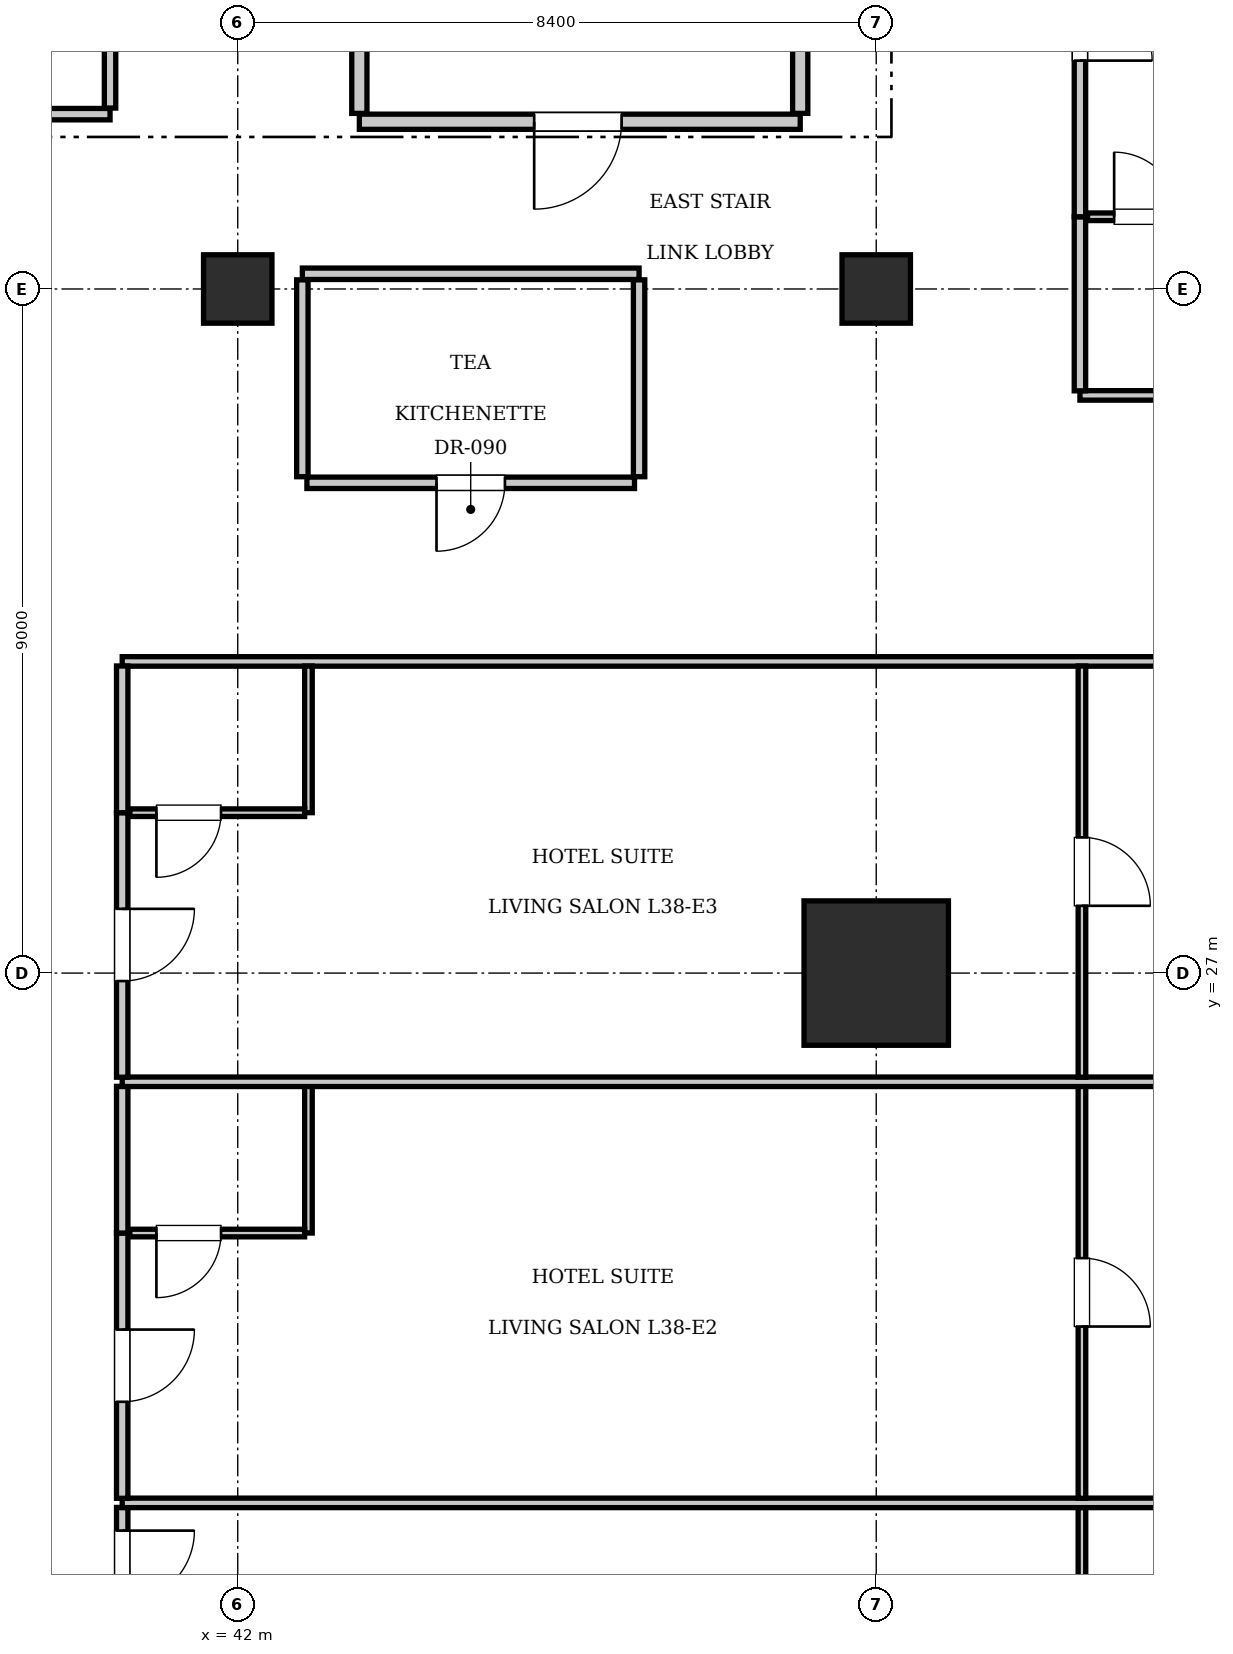
"""IFC4 building model, lengths in metres.
Left out: names, types, materials, properties, quantities, classifications, styles, units other than length and angle.
Written with IfcOpenShell. Run it as: python <this file> out.ifc"""

import sys

from ifc_helpers import new_model, si_unit, direction, frame, frame_2d, origin, origin_2d, place, context, subcontext, project, spatial, rectangle, extrude, element, fill, save


model = new_model("IFC4")
c1 = context("Model", 3, precision=1e-05, world=origin(), true_north=direction((0.0, 1.0)))
c2 = subcontext(c1, "Body", "Model", "MODEL_VIEW")
j1 = project(units=[si_unit("LENGTHUNIT", "METRE"), si_unit("PLANEANGLEUNIT", "RADIAN")], contexts=[c1])
p1 = place(None, origin())
s1 = spatial("IfcSite", under=j1, at=p1, CompositionType="ELEMENT")
p2 = place(p1, origin())
s2 = spatial("IfcBuilding", under=s1, at=p2, CompositionType="ELEMENT")
p3 = place(p2, frame((0.0, 0.0, 158.2)))
s3 = spatial("IfcBuildingStorey", under=s2, at=p3, CompositionType="ELEMENT", Elevation=158.2)
p4 = place(p3, frame((50.4, 27.0, 0.0), z_axis=(0.0, 0.0, 1.0), x_axis=(1.0, 0.0, 0.0)))
e1 = element("IfcColumn", 1, at=p4, inside=s3, PredefinedType="COLUMN", context=c2, shape_type="SweptSolid", body=[
    extrude(rectangle(XDim=1.9, YDim=1.9, at=origin_2d()), origin(), (0.0, 0.0, 1.0), 3.85),
])
for number, where, z_axis, x_axis in (
    (2, (42.0, 36.0, 0.0), (0.0, 0.0, 1.0), (1.0, 0.0, 0.0)),
    (3, (50.4, 36.0, 0.0), (0.0, 0.0, 1.0), (1.0, 0.0, 0.0)),
):
    element("IfcColumn", number, at=place(p3, frame(where, z_axis=z_axis, x_axis=x_axis)), inside=s3, PredefinedType="COLUMN", context=c2, shape_type="SweptSolid", body=[
        extrude(rectangle(XDim=0.9, YDim=0.9, at=origin_2d()), origin(), (0.0, 0.0, 1.0), 3.85),
    ])
p5 = place(p3, frame((43.6, 38.2, 0.0), z_axis=(0.0, 0.0, 1.0), x_axis=(1.0, 0.0, 0.0)))
e4 = element("IfcWall", 4, at=p5, inside=s3, PredefinedType="PARTITIONING", context=c2, shape_type="SweptSolid", body=[
    extrude(rectangle(XDim=5.8, YDim=0.2, at=frame_2d((2.9, 0.0))), origin(), (0.0, 0.0, 1.0), 3.61),
])
p6 = place(p5, frame((2.3, 0.0, 0.0)))
e5 = element("IfcOpeningElement", 5, at=p6, cuts=e4, PredefinedType="OPENING", context=c2, shape_type="SweptSolid", body=[
    extrude(rectangle(XDim=1.15, YDim=2.15, at=frame_2d((0.575, 1.075))), frame((0.0, 0.11, 0.0), z_axis=(0.0, -1.0, 0.0), x_axis=(1.0, 0.0, 0.0)), (0.0, 0.0, 1.0), 0.22),
])
for number, where, z_axis, x_axis in (
    (6, (43.6, 38.31, 0.0), (0.0, 0.0, 1.0), (0.0, 1.0, 0.0)),
    (7, (49.4, 38.31, 0.0), (0.0, 0.0, 1.0), (0.0, 1.0, 0.0)),
):
    element("IfcWall", number, at=place(p3, frame(where, z_axis=z_axis, x_axis=x_axis)), inside=s3, PredefinedType="PARTITIONING", context=c2, shape_type="SweptSolid", body=[
        extrude(rectangle(XDim=3.07, YDim=0.2, at=frame_2d((1.535, 0.0))), origin(), (0.0, 0.0, 1.0), 3.61),
    ])
p7 = place(p3, frame((37.38, 38.3, 0.0), z_axis=(0.0, 0.0, 1.0), x_axis=(1.0, 0.0, 0.0)))
e8 = element("IfcWall", 8, at=p7, inside=s3, PredefinedType="PARTITIONING", context=c2, shape_type="SweptSolid", body=[
    extrude(rectangle(XDim=2.94, YDim=0.15, at=frame_2d((1.47, 0.0))), origin(), (0.0, 0.0, 1.0), 3.61),
])
p8 = place(p7, frame((1.0, 0.0, 0.0)))
e9 = element("IfcOpeningElement", 9, at=p8, cuts=e8, PredefinedType="OPENING", context=c2, shape_type="SweptSolid", body=[
    extrude(rectangle(XDim=0.8, YDim=2.05, at=frame_2d((0.4, 1.025))), frame((0.0, 0.085, 0.0), z_axis=(0.0, -1.0, 0.0), x_axis=(1.0, 0.0, 0.0)), (0.0, 0.0, 1.0), 0.17),
])
p9 = place(p3, frame((40.32, 38.38, 0.0), z_axis=(0.0, 0.0, 1.0), x_axis=(0.0, 1.0, 0.0)))
e10 = element("IfcWall", 10, at=p9, inside=s3, PredefinedType="PARTITIONING", context=c2, shape_type="SweptSolid", body=[
    extrude(rectangle(XDim=2.84, YDim=0.15, at=frame_2d((1.42, 0.0))), origin(), (0.0, 0.0, 1.0), 3.61),
])
p10 = place(p3, frame((42.85, 36.2, 0.0), z_axis=(0.0, 0.0, 1.0), x_axis=(1.0, 0.0, 0.0)))
e11 = element("IfcWall", 11, at=p10, inside=s3, PredefinedType="PARTITIONING", context=c2, shape_type="SweptSolid", body=[
    extrude(rectangle(XDim=4.43, YDim=0.15, at=frame_2d((2.215, 0.0))), origin(), (0.0, 0.0, 1.0), 3.61),
])
for number, where, z_axis, x_axis in (
    (12, (42.85, 33.53, 0.0), (0.0, 0.0, 1.0), (0.0, 1.0, 0.0)),
    (13, (47.28, 33.53, 0.0), (0.0, 0.0, 1.0), (0.0, 1.0, 0.0)),
):
    element("IfcWall", number, at=place(p3, frame(where, z_axis=z_axis, x_axis=x_axis)), inside=s3, PredefinedType="PARTITIONING", context=c2, shape_type="SweptSolid", body=[
        extrude(rectangle(XDim=2.59, YDim=0.15, at=frame_2d((1.295, 0.0))), origin(), (0.0, 0.0, 1.0), 3.61),
    ])
p11 = place(p3, frame((42.91, 33.45, 0.0), z_axis=(0.0, 0.0, 1.0), x_axis=(1.0, 0.0, 0.0)))
e14 = element("IfcWall", 14, at=p11, inside=s3, PredefinedType="PARTITIONING", context=c2, shape_type="SweptSolid", body=[
    extrude(rectangle(XDim=4.31, YDim=0.15, at=frame_2d((2.155, 0.0))), origin(), (0.0, 0.0, 1.0), 3.61),
])
p12 = place(p11, frame((1.705, 0.0, 0.0)))
e15 = element("IfcOpeningElement", 15, at=p12, cuts=e14, PredefinedType="OPENING", context=c2, shape_type="SweptSolid", body=[
    extrude(rectangle(XDim=0.9, YDim=2.1, at=frame_2d((0.45, 1.05))), frame((0.0, 0.085, 0.0), z_axis=(0.0, -1.0, 0.0), x_axis=(1.0, 0.0, 0.0)), (0.0, 0.0, 1.0), 0.17),
])
p13 = place(p3, frame((40.48, 31.1, 0.0), z_axis=(0.0, 0.0, 1.0), x_axis=(1.0, 0.0, 0.0)))
e16 = element("IfcWall", 16, at=p13, inside=s3, PredefinedType="PARTITIONING", context=c2, shape_type="SweptSolid", body=[
    extrude(rectangle(XDim=21.92, YDim=0.125, at=frame_2d((10.96, 0.0))), origin(), (0.0, 0.0, 1.0), 3.61),
])
p14 = place(p3, frame((40.48, 16.49, 0.0), z_axis=(0.0, 0.0, 1.0), x_axis=(0.0, 1.0, 0.0)))
e17 = element("IfcWall", 17, at=p14, inside=s3, PredefinedType="PARTITIONING", context=c2, shape_type="SweptSolid", body=[
    extrude(rectangle(XDim=3.48, YDim=0.15, at=frame_2d((1.74, 0.0))), origin(), (0.0, 0.0, 1.0), 3.61),
])
p15 = place(p14, frame((2.225, 0.0, 0.0)))
e18 = element("IfcOpeningElement", 18, at=p15, cuts=e17, PredefinedType="OPENING", context=c2, shape_type="SweptSolid", body=[
    extrude(rectangle(XDim=0.95, YDim=2.15, at=frame_2d((0.475, 1.075))), frame((0.0, 0.085, 0.0), z_axis=(0.0, -1.0, 0.0), x_axis=(1.0, 0.0, 0.0)), (0.0, 0.0, 1.0), 0.17),
])
p16 = place(p3, frame((53.106, 14.56, 0.0), z_axis=(0.0, 0.0, 1.0), x_axis=(0.0, 1.0, 0.0)))
e19 = element("IfcWall", 19, at=p16, inside=s3, PredefinedType="PARTITIONING", context=c2, shape_type="SweptSolid", body=[
    extrude(rectangle(XDim=5.41, YDim=0.1, at=frame_2d((2.705, 0.0))), origin(), (0.0, 0.0, 1.0), 3.61),
])
p17 = place(p16, frame((2.255, 0.0, 0.0)))
e20 = element("IfcOpeningElement", 20, at=p17, cuts=e19, PredefinedType="OPENING", context=c2, shape_type="SweptSolid", body=[
    extrude(rectangle(XDim=0.9, YDim=2.1, at=frame_2d((0.45, 1.05))), frame((0.0, 0.06, 0.0), z_axis=(0.0, -1.0, 0.0), x_axis=(1.0, 0.0, 0.0)), (0.0, 0.0, 1.0), 0.12),
])
p18 = place(p3, frame((40.48, 20.03, 0.0), z_axis=(0.0, 0.0, 1.0), x_axis=(1.0, 0.0, 0.0)))
e21 = element("IfcWall", 21, at=p18, inside=s3, PredefinedType="PARTITIONING", context=c2, shape_type="SweptSolid", body=[
    extrude(rectangle(XDim=21.92, YDim=0.125, at=frame_2d((10.96, 0.0))), origin(), (0.0, 0.0, 1.0), 3.61),
])
p19 = place(p3, frame((40.48, 20.09, 0.0), z_axis=(0.0, 0.0, 1.0), x_axis=(0.0, 1.0, 0.0)))
e22 = element("IfcWall", 22, at=p19, inside=s3, PredefinedType="PARTITIONING", context=c2, shape_type="SweptSolid", body=[
    extrude(rectangle(XDim=3.49, YDim=0.15, at=frame_2d((1.745, 0.0))), origin(), (0.0, 0.0, 1.0), 3.61),
])
p20 = place(p19, frame((1.27, 0.0, 0.0)))
e23 = element("IfcOpeningElement", 23, at=p20, cuts=e22, PredefinedType="OPENING", context=c2, shape_type="SweptSolid", body=[
    extrude(rectangle(XDim=0.95, YDim=2.15, at=frame_2d((0.475, 1.075))), frame((0.0, 0.085, 0.0), z_axis=(0.0, -1.0, 0.0), x_axis=(1.0, 0.0, 0.0)), (0.0, 0.0, 1.0), 0.17),
])
p21 = place(p3, frame((40.48, 23.58, 0.0), z_axis=(0.0, 0.0, 1.0), x_axis=(0.0, 1.0, 0.0)))
e24 = element("IfcWall", 24, at=p21, inside=s3, PredefinedType="PARTITIONING", context=c2, shape_type="SweptSolid", body=[
    extrude(rectangle(XDim=1.93, YDim=0.15, at=frame_2d((0.965, 0.0))), origin(), (0.0, 0.0, 1.0), 3.61),
])
p22 = place(p3, frame((42.93, 23.58, 0.0), z_axis=(0.0, 0.0, 1.0), x_axis=(0.0, 1.0, 0.0)))
e25 = element("IfcWall", 25, at=p22, inside=s3, PredefinedType="PARTITIONING", context=c2, shape_type="SweptSolid", body=[
    extrude(rectangle(XDim=1.93, YDim=0.1, at=frame_2d((0.965, 0.0))), origin(), (0.0, 0.0, 1.0), 3.61),
])
p23 = place(p3, frame((40.58, 23.58, 0.0), z_axis=(0.0, 0.0, 1.0), x_axis=(1.0, 0.0, 0.0)))
e26 = element("IfcWall", 26, at=p23, inside=s3, PredefinedType="PARTITIONING", context=c2, shape_type="SweptSolid", body=[
    extrude(rectangle(XDim=2.3, YDim=0.1, at=frame_2d((1.15, 0.0))), origin(), (0.0, 0.0, 1.0), 3.61),
])
p24 = place(p23, frame((0.35, 0.0, 0.0)))
e27 = element("IfcOpeningElement", 27, at=p24, cuts=e26, PredefinedType="OPENING", context=c2, shape_type="SweptSolid", body=[
    extrude(rectangle(XDim=0.85, YDim=2.1, at=frame_2d((0.425, 1.05))), frame((0.0, 0.06, 0.0), z_axis=(0.0, -1.0, 0.0), x_axis=(1.0, 0.0, 0.0)), (0.0, 0.0, 1.0), 0.12),
])
p25 = place(p3, frame((53.106, 20.09, 0.0), z_axis=(0.0, 0.0, 1.0), x_axis=(0.0, 1.0, 0.0)))
e28 = element("IfcWall", 28, at=p25, inside=s3, PredefinedType="PARTITIONING", context=c2, shape_type="SweptSolid", body=[
    extrude(rectangle(XDim=5.42, YDim=0.1, at=frame_2d((2.71, 0.0))), origin(), (0.0, 0.0, 1.0), 3.61),
])
p26 = place(p25, frame((2.26, 0.0, 0.0)))
e29 = element("IfcOpeningElement", 29, at=p26, cuts=e28, PredefinedType="OPENING", context=c2, shape_type="SweptSolid", body=[
    extrude(rectangle(XDim=0.9, YDim=2.1, at=frame_2d((0.45, 1.05))), frame((0.0, 0.06, 0.0), z_axis=(0.0, -1.0, 0.0), x_axis=(1.0, 0.0, 0.0)), (0.0, 0.0, 1.0), 0.12),
])
p27 = place(p3, frame((40.48, 25.57, 0.0), z_axis=(0.0, 0.0, 1.0), x_axis=(1.0, 0.0, 0.0)))
e30 = element("IfcWall", 30, at=p27, inside=s3, PredefinedType="PARTITIONING", context=c2, shape_type="SweptSolid", body=[
    extrude(rectangle(XDim=21.92, YDim=0.125, at=frame_2d((10.96, 0.0))), origin(), (0.0, 0.0, 1.0), 3.61),
])
p28 = place(p3, frame((40.48, 25.63, 0.0), z_axis=(0.0, 0.0, 1.0), x_axis=(0.0, 1.0, 0.0)))
e31 = element("IfcWall", 31, at=p28, inside=s3, PredefinedType="PARTITIONING", context=c2, shape_type="SweptSolid", body=[
    extrude(rectangle(XDim=3.48, YDim=0.15, at=frame_2d((1.74, 0.0))), origin(), (0.0, 0.0, 1.0), 3.61),
])
p29 = place(p28, frame((1.265, 0.0, 0.0)))
e32 = element("IfcOpeningElement", 32, at=p29, cuts=e31, PredefinedType="OPENING", context=c2, shape_type="SweptSolid", body=[
    extrude(rectangle(XDim=0.95, YDim=2.15, at=frame_2d((0.475, 1.075))), frame((0.0, 0.085, 0.0), z_axis=(0.0, -1.0, 0.0), x_axis=(1.0, 0.0, 0.0)), (0.0, 0.0, 1.0), 0.17),
])
p30 = place(p3, frame((40.48, 29.11, 0.0), z_axis=(0.0, 0.0, 1.0), x_axis=(0.0, 1.0, 0.0)))
e33 = element("IfcWall", 33, at=p30, inside=s3, PredefinedType="PARTITIONING", context=c2, shape_type="SweptSolid", body=[
    extrude(rectangle(XDim=1.93, YDim=0.15, at=frame_2d((0.965, 0.0))), origin(), (0.0, 0.0, 1.0), 3.61),
])
p31 = place(p3, frame((42.93, 29.11, 0.0), z_axis=(0.0, 0.0, 1.0), x_axis=(0.0, 1.0, 0.0)))
e34 = element("IfcWall", 34, at=p31, inside=s3, PredefinedType="PARTITIONING", context=c2, shape_type="SweptSolid", body=[
    extrude(rectangle(XDim=1.93, YDim=0.1, at=frame_2d((0.965, 0.0))), origin(), (0.0, 0.0, 1.0), 3.61),
])
p32 = place(p3, frame((40.58, 29.11, 0.0), z_axis=(0.0, 0.0, 1.0), x_axis=(1.0, 0.0, 0.0)))
e35 = element("IfcWall", 35, at=p32, inside=s3, PredefinedType="PARTITIONING", context=c2, shape_type="SweptSolid", body=[
    extrude(rectangle(XDim=2.3, YDim=0.1, at=frame_2d((1.15, 0.0))), origin(), (0.0, 0.0, 1.0), 3.61),
])
p33 = place(p32, frame((0.35, 0.0, 0.0)))
e36 = element("IfcOpeningElement", 36, at=p33, cuts=e35, PredefinedType="OPENING", context=c2, shape_type="SweptSolid", body=[
    extrude(rectangle(XDim=0.85, YDim=2.1, at=frame_2d((0.425, 1.05))), frame((0.0, 0.06, 0.0), z_axis=(0.0, -1.0, 0.0), x_axis=(1.0, 0.0, 0.0)), (0.0, 0.0, 1.0), 0.12),
])
p34 = place(p3, frame((53.106, 25.63, 0.0), z_axis=(0.0, 0.0, 1.0), x_axis=(0.0, 1.0, 0.0)))
e37 = element("IfcWall", 37, at=p34, inside=s3, PredefinedType="PARTITIONING", context=c2, shape_type="SweptSolid", body=[
    extrude(rectangle(XDim=5.41, YDim=0.1, at=frame_2d((2.705, 0.0))), origin(), (0.0, 0.0, 1.0), 3.61),
])
p35 = place(p34, frame((2.255, 0.0, 0.0)))
e38 = element("IfcOpeningElement", 38, at=p35, cuts=e37, PredefinedType="OPENING", context=c2, shape_type="SweptSolid", body=[
    extrude(rectangle(XDim=0.9, YDim=2.1, at=frame_2d((0.45, 1.05))), frame((0.0, 0.06, 0.0), z_axis=(0.0, -1.0, 0.0), x_axis=(1.0, 0.0, 0.0)), (0.0, 0.0, 1.0), 0.12),
])
p36 = place(p3, frame((53.08, 34.6, 0.0), z_axis=(0.0, 0.0, 1.0), x_axis=(1.0, 0.0, 0.0)))
e39 = element("IfcWall", 39, at=p36, inside=s3, PredefinedType="PARTITIONING", context=c2, shape_type="SweptSolid", body=[
    extrude(rectangle(XDim=9.32, YDim=0.125, at=frame_2d((4.66, 0.0))), origin(), (0.0, 0.0, 1.0), 3.61),
])
p37 = place(p3, frame((53.08, 34.66, 0.0), z_axis=(0.0, 0.0, 1.0), x_axis=(0.0, 1.0, 0.0)))
e40 = element("IfcWall", 40, at=p37, inside=s3, PredefinedType="PARTITIONING", context=c2, shape_type="SweptSolid", body=[
    extrude(rectangle(XDim=2.29, YDim=0.15, at=frame_2d((1.145, 0.0))), origin(), (0.0, 0.0, 1.0), 3.61),
])
p38 = place(p3, frame((53.08, 36.95, 0.0), z_axis=(0.0, 0.0, 1.0), x_axis=(0.0, 1.0, 0.0)))
e41 = element("IfcWall", 41, at=p38, inside=s3, PredefinedType="PARTITIONING", context=c2, shape_type="SweptSolid", body=[
    extrude(rectangle(XDim=5.059, YDim=0.15, at=frame_2d((2.529, 0.0))), origin(), (0.0, 0.0, 1.0), 3.61),
])
p39 = place(p38, frame((2.054, 0.0, 0.0)))
e42 = element("IfcOpeningElement", 42, at=p39, cuts=e41, PredefinedType="OPENING", context=c2, shape_type="SweptSolid", body=[
    extrude(rectangle(XDim=0.95, YDim=2.15, at=frame_2d((0.475, 1.075))), frame((0.0, 0.085, 0.0), z_axis=(0.0, -1.0, 0.0), x_axis=(1.0, 0.0, 0.0)), (0.0, 0.0, 1.0), 0.17),
])
p40 = place(p3, frame((53.18, 36.95, 0.0), z_axis=(0.0, 0.0, 1.0), x_axis=(1.0, 0.0, 0.0)))
e43 = element("IfcWall", 43, at=p40, inside=s3, PredefinedType="PARTITIONING", context=c2, shape_type="SweptSolid", body=[
    extrude(rectangle(XDim=2.3, YDim=0.1, at=frame_2d((1.15, 0.0))), origin(), (0.0, 0.0, 1.0), 3.61),
])
p41 = place(p40, frame((0.35, 0.0, 0.0)))
e44 = element("IfcOpeningElement", 44, at=p41, cuts=e43, PredefinedType="OPENING", context=c2, shape_type="SweptSolid", body=[
    extrude(rectangle(XDim=0.85, YDim=2.1, at=frame_2d((0.425, 1.05))), frame((0.0, 0.06, 0.0), z_axis=(0.0, -1.0, 0.0), x_axis=(1.0, 0.0, 0.0)), (0.0, 0.0, 1.0), 0.12),
])
p42 = place(p6, frame((1.15, 0.0, 0.0), z_axis=(0.0, 0.0, 1.0), x_axis=(-1.0, 0.0, 0.0)))
e45 = element("IfcDoor", 45, at=p42, inside=s3, OperationType="SINGLE_SWING_RIGHT", PredefinedType="DOOR", context=c2, shape_type="SweptSolid", body=[
    extrude(rectangle(XDim=1.15, YDim=2.15, at=frame_2d((0.575, 1.075))), frame((0.0, 0.025, 0.0), z_axis=(0.0, -1.0, 0.0), x_axis=(1.0, 0.0, 0.0)), (0.0, 0.0, 1.0), 0.05),
])
fill(e5, e45)
p43 = place(p12, frame((0.9, 0.0, 0.0), z_axis=(0.0, 0.0, 1.0), x_axis=(-1.0, 0.0, 0.0)))
e46 = element("IfcDoor", 46, at=p43, inside=s3, OperationType="SINGLE_SWING_RIGHT", PredefinedType="DOOR", context=c2, shape_type="SweptSolid", body=[
    extrude(rectangle(XDim=0.9, YDim=2.1, at=frame_2d((0.45, 1.05))), frame((0.0, 0.025, 0.0), z_axis=(0.0, -1.0, 0.0), x_axis=(1.0, 0.0, 0.0)), (0.0, 0.0, 1.0), 0.05),
])
fill(e15, e46)
p44 = place(p15, frame((0.95, 0.0, 0.0), z_axis=(0.0, 0.0, 1.0), x_axis=(-1.0, 0.0, 0.0)))
e47 = element("IfcDoor", 47, at=p44, inside=s3, OperationType="SINGLE_SWING_LEFT", PredefinedType="DOOR", context=c2, shape_type="SweptSolid", body=[
    extrude(rectangle(XDim=0.95, YDim=2.15, at=frame_2d((0.475, 1.075))), frame((0.0, 0.025, 0.0), z_axis=(0.0, -1.0, 0.0), x_axis=(1.0, 0.0, 0.0)), (0.0, 0.0, 1.0), 0.05),
])
fill(e18, e47)
p45 = place(p24, frame((0.85, 0.0, 0.0), z_axis=(0.0, 0.0, 1.0), x_axis=(-1.0, 0.0, 0.0)))
e48 = element("IfcDoor", 48, at=p45, inside=s3, OperationType="SINGLE_SWING_RIGHT", PredefinedType="DOOR", context=c2, shape_type="SweptSolid", body=[
    extrude(rectangle(XDim=0.85, YDim=2.1, at=frame_2d((0.425, 1.05))), frame((0.0, 0.025, 0.0), z_axis=(0.0, -1.0, 0.0), x_axis=(1.0, 0.0, 0.0)), (0.0, 0.0, 1.0), 0.05),
])
fill(e27, e48)
p46 = place(p20, frame((0.95, 0.0, 0.0), z_axis=(0.0, 0.0, 1.0), x_axis=(-1.0, 0.0, 0.0)))
e49 = element("IfcDoor", 49, at=p46, inside=s3, OperationType="SINGLE_SWING_LEFT", PredefinedType="DOOR", context=c2, shape_type="SweptSolid", body=[
    extrude(rectangle(XDim=0.95, YDim=2.15, at=frame_2d((0.475, 1.075))), frame((0.0, 0.025, 0.0), z_axis=(0.0, -1.0, 0.0), x_axis=(1.0, 0.0, 0.0)), (0.0, 0.0, 1.0), 0.05),
])
fill(e23, e49)
p47 = place(p26, frame((0.9, 0.0, 0.0), z_axis=(0.0, 0.0, 1.0), x_axis=(-1.0, 0.0, 0.0)))
e50 = element("IfcDoor", 50, at=p47, inside=s3, OperationType="SINGLE_SWING_RIGHT", PredefinedType="DOOR", context=c2, shape_type="SweptSolid", body=[
    extrude(rectangle(XDim=0.9, YDim=2.1, at=frame_2d((0.45, 1.05))), frame((0.0, 0.025, 0.0), z_axis=(0.0, -1.0, 0.0), x_axis=(1.0, 0.0, 0.0)), (0.0, 0.0, 1.0), 0.05),
])
fill(e29, e50)
p48 = place(p33, frame((0.85, 0.0, 0.0), z_axis=(0.0, 0.0, 1.0), x_axis=(-1.0, 0.0, 0.0)))
e51 = element("IfcDoor", 51, at=p48, inside=s3, OperationType="SINGLE_SWING_RIGHT", PredefinedType="DOOR", context=c2, shape_type="SweptSolid", body=[
    extrude(rectangle(XDim=0.85, YDim=2.1, at=frame_2d((0.425, 1.05))), frame((0.0, 0.025, 0.0), z_axis=(0.0, -1.0, 0.0), x_axis=(1.0, 0.0, 0.0)), (0.0, 0.0, 1.0), 0.05),
])
fill(e36, e51)
p49 = place(p29, frame((0.95, 0.0, 0.0), z_axis=(0.0, 0.0, 1.0), x_axis=(-1.0, 0.0, 0.0)))
e52 = element("IfcDoor", 52, at=p49, inside=s3, OperationType="SINGLE_SWING_LEFT", PredefinedType="DOOR", context=c2, shape_type="SweptSolid", body=[
    extrude(rectangle(XDim=0.95, YDim=2.15, at=frame_2d((0.475, 1.075))), frame((0.0, 0.025, 0.0), z_axis=(0.0, -1.0, 0.0), x_axis=(1.0, 0.0, 0.0)), (0.0, 0.0, 1.0), 0.05),
])
fill(e32, e52)
p50 = place(p35, frame((0.9, 0.0, 0.0), z_axis=(0.0, 0.0, 1.0), x_axis=(-1.0, 0.0, 0.0)))
e53 = element("IfcDoor", 53, at=p50, inside=s3, OperationType="SINGLE_SWING_RIGHT", PredefinedType="DOOR", context=c2, shape_type="SweptSolid", body=[
    extrude(rectangle(XDim=0.9, YDim=2.1, at=frame_2d((0.45, 1.05))), frame((0.0, 0.025, 0.0), z_axis=(0.0, -1.0, 0.0), x_axis=(1.0, 0.0, 0.0)), (0.0, 0.0, 1.0), 0.05),
])
fill(e38, e53)
p51 = place(p41, origin())
e54 = element("IfcDoor", 54, at=p51, inside=s3, OperationType="SINGLE_SWING_LEFT", PredefinedType="DOOR", context=c2, shape_type="SweptSolid", body=[
    extrude(rectangle(XDim=0.85, YDim=2.1, at=frame_2d((0.425, 1.05))), frame((0.0, 0.025, 0.0), z_axis=(0.0, -1.0, 0.0), x_axis=(1.0, 0.0, 0.0)), (0.0, 0.0, 1.0), 0.05),
])
fill(e44, e54)
p52 = place(p39, frame((0.95, 0.0, 0.0), z_axis=(0.0, 0.0, 1.0), x_axis=(-1.0, 0.0, 0.0)))
e55 = element("IfcDoor", 55, at=p52, inside=s3, OperationType="SINGLE_SWING_RIGHT", PredefinedType="DOOR", context=c2, shape_type="SweptSolid", body=[
    extrude(rectangle(XDim=0.95, YDim=2.15, at=frame_2d((0.475, 1.075))), frame((0.0, 0.025, 0.0), z_axis=(0.0, -1.0, 0.0), x_axis=(1.0, 0.0, 0.0)), (0.0, 0.0, 1.0), 0.05),
])
fill(e42, e55)
save(model, sys.argv[1])
